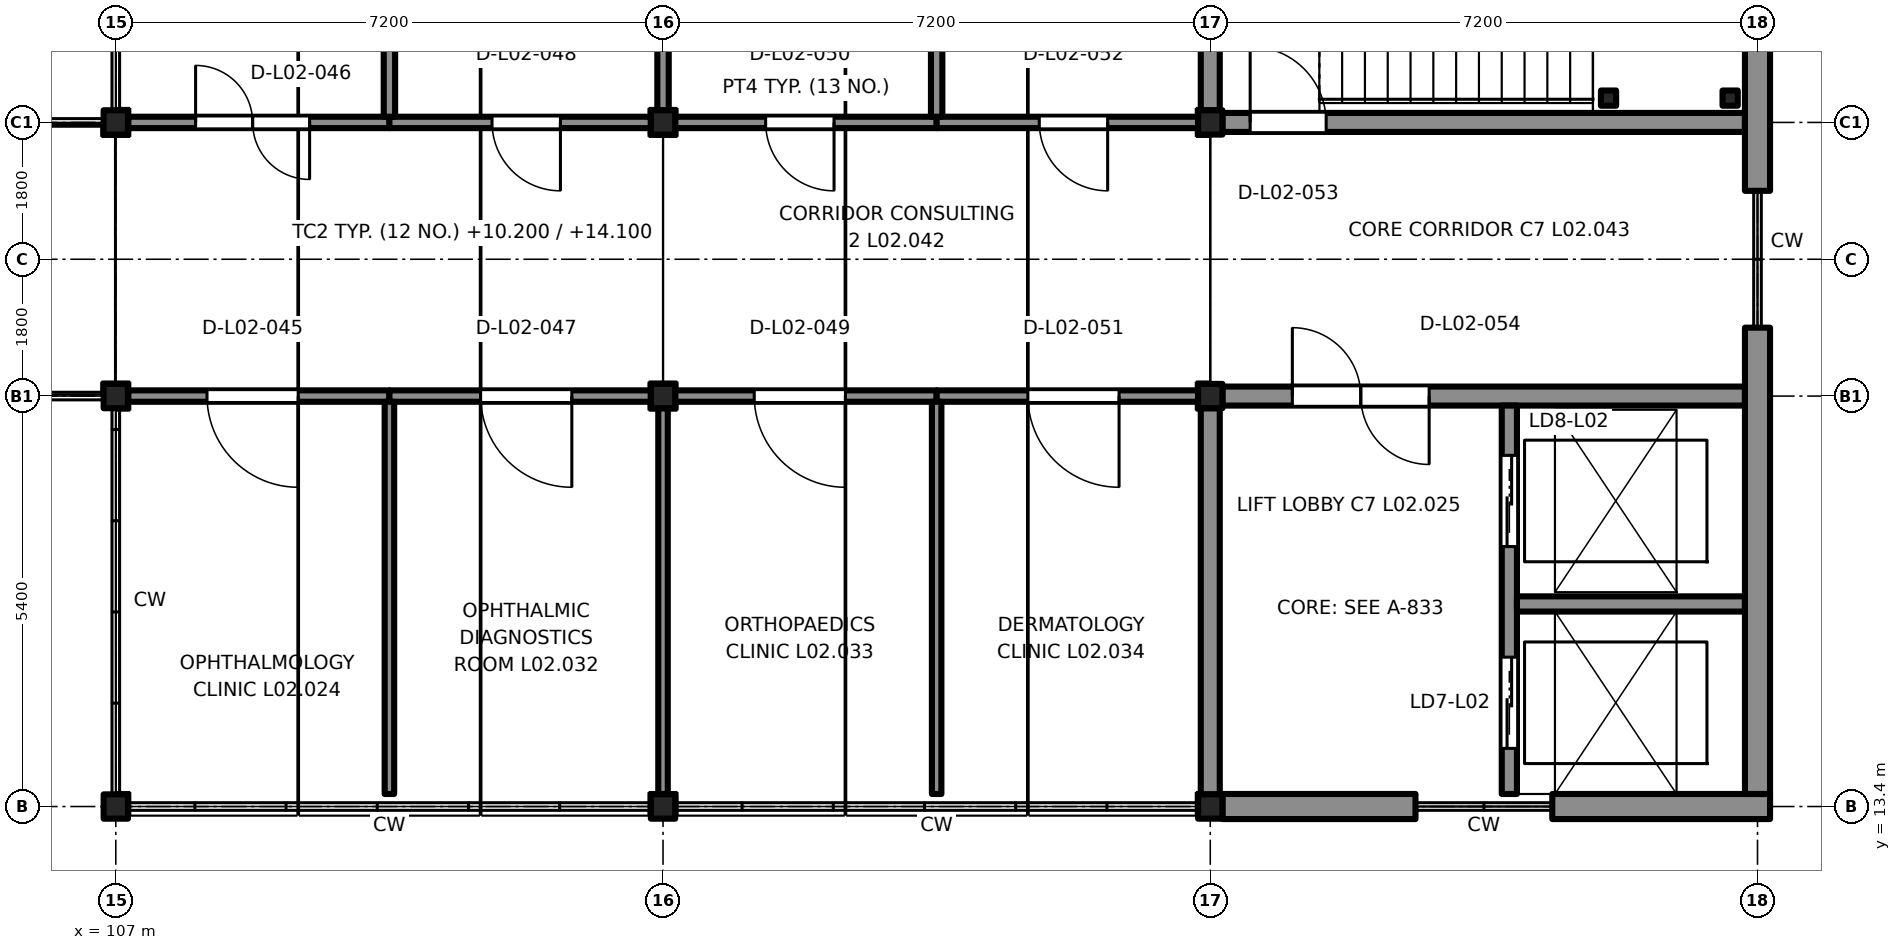
"""IFC4 building model, lengths in metres.
Left out: names, types, materials, properties, quantities, classifications, styles, units other than length and angle.
Written with IfcOpenShell. Run it as: python <this file> out.ifc"""

import sys

from ifc_helpers import new_model, si_unit, direction, frame, frame_2d, origin, origin_2d, place, context, subcontext, project, spatial, rectangle, extrude, element, fill, save


model = new_model("IFC4")
c1 = context("Model", 3, precision=1e-05, world=origin(), true_north=direction((0.0, 1.0)))
c2 = subcontext(c1, "Body", "Model", "MODEL_VIEW")
j1 = project(units=[si_unit("LENGTHUNIT", "METRE"), si_unit("PLANEANGLEUNIT", "RADIAN")], contexts=[c1])
p1 = place(None, origin())
s1 = spatial("IfcSite", under=j1, at=p1, CompositionType="ELEMENT")
p2 = place(p1, origin())
s2 = spatial("IfcBuilding", under=s1, at=p2, CompositionType="ELEMENT")
p3 = place(p2, frame((0.0, 0.0, 10.2)))
s3 = spatial("IfcBuildingStorey", under=s2, at=p3, CompositionType="ELEMENT", Elevation=10.2)
for number, where, z_axis, x_axis in (
    (1, (107.0, 13.4, 0.0), (0.0, 0.0, 1.0), (1.0, 0.0, 0.0)),
    (2, (107.0, 18.8, 0.0), (0.0, 0.0, 1.0), (1.0, 0.0, 0.0)),
    (3, (107.0, 22.4, 0.0), (0.0, 0.0, 1.0), (1.0, 0.0, 0.0)),
    (4, (114.2, 13.4, 0.0), (0.0, 0.0, 1.0), (1.0, 0.0, 0.0)),
    (5, (114.2, 18.8, 0.0), (0.0, 0.0, 1.0), (1.0, 0.0, 0.0)),
    (6, (114.2, 22.4, 0.0), (0.0, 0.0, 1.0), (1.0, 0.0, 0.0)),
    (7, (121.4, 13.4, 0.0), (0.0, 0.0, 1.0), (1.0, 0.0, 0.0)),
    (8, (121.4, 18.8, 0.0), (0.0, 0.0, 1.0), (1.0, 0.0, 0.0)),
    (9, (121.4, 22.4, 0.0), (0.0, 0.0, 1.0), (1.0, 0.0, 0.0)),
):
    element("IfcColumn", number, at=place(p3, frame(where, z_axis=z_axis, x_axis=x_axis)), inside=s3, PredefinedType="COLUMN", context=c2, shape_type="SweptSolid", body=[
        extrude(rectangle(XDim=0.32, YDim=0.32, at=origin_2d()), origin(), (0.0, 0.0, 1.0), 3.9),
    ])
p4 = place(p3, frame((121.56, 22.4, 0.0), z_axis=(0.0, 0.0, 1.0), x_axis=(1.0, 0.0, 0.0)))
e10 = element("IfcWall", 10, at=p4, inside=s3, PredefinedType="SHEAR", context=c2, shape_type="SweptSolid", body=[
    extrude(rectangle(XDim=6.875, YDim=0.25, at=frame_2d((3.438, 0.0))), origin(), (0.0, 0.0, 1.0), 3.65),
])
p5 = place(p4, frame((0.365, 0.0, 0.0)))
e11 = element("IfcOpeningElement", 11, at=p5, cuts=e10, PredefinedType="OPENING", context=c2, shape_type="SweptSolid", body=[
    extrude(rectangle(XDim=1.0, YDim=2.1, at=frame_2d((0.5, 1.05))), frame((0.0, 0.135, 0.0), z_axis=(0.0, -1.0, 0.0), x_axis=(1.0, 0.0, 0.0)), (0.0, 0.0, 1.0), 0.27),
])
p6 = place(p3, frame((121.4, 22.56, 0.0), z_axis=(0.0, 0.0, 1.0), x_axis=(0.0, 1.0, 0.0)))
e12 = element("IfcWall", 12, at=p6, inside=s3, PredefinedType="SHEAR", context=c2, shape_type="SweptSolid", body=[
    extrude(rectangle(XDim=5.08, YDim=0.25, at=frame_2d((2.54, 0.0))), origin(), (0.0, 0.0, 1.0), 3.65),
])
p7 = place(p3, frame((121.56, 18.8, 0.0), z_axis=(0.0, 0.0, 1.0), x_axis=(1.0, 0.0, 0.0)))
e13 = element("IfcWall", 13, at=p7, inside=s3, PredefinedType="SHEAR", context=c2, shape_type="SweptSolid", body=[
    extrude(rectangle(XDim=6.875, YDim=0.25, at=frame_2d((3.438, 0.0))), origin(), (0.0, 0.0, 1.0), 3.65),
])
p8 = place(p7, frame((0.92, 0.0, 0.0)))
e14 = element("IfcOpeningElement", 14, at=p8, cuts=e13, PredefinedType="OPENING", context=c2, shape_type="SweptSolid", body=[
    extrude(rectangle(XDim=1.8, YDim=2.1, at=frame_2d((0.9, 1.05))), frame((0.0, 0.135, 0.0), z_axis=(0.0, -1.0, 0.0), x_axis=(1.0, 0.0, 0.0)), (0.0, 0.0, 1.0), 0.27),
])
p9 = place(p3, frame((121.4, 13.56, 0.0), z_axis=(0.0, 0.0, 1.0), x_axis=(0.0, 1.0, 0.0)))
e15 = element("IfcWall", 15, at=p9, inside=s3, PredefinedType="SHEAR", context=c2, shape_type="SweptSolid", body=[
    extrude(rectangle(XDim=5.08, YDim=0.25, at=frame_2d((2.54, 0.0))), origin(), (0.0, 0.0, 1.0), 3.65),
])
p10 = place(p3, frame((125.335, 13.565, 0.0), z_axis=(0.0, 0.0, 1.0), x_axis=(0.0, 1.0, 0.0)))
e16 = element("IfcWall", 16, at=p10, inside=s3, PredefinedType="SHEAR", context=c2, shape_type="SweptSolid", body=[
    extrude(rectangle(XDim=5.11, YDim=0.2, at=frame_2d((2.555, 0.0))), origin(), (0.0, 0.0, 1.0), 3.65),
])
p11 = place(p10, frame((0.6, 0.0, 0.0)))
e17 = element("IfcOpeningElement", 17, at=p11, cuts=e16, PredefinedType="OPENING", context=c2, shape_type="SweptSolid", body=[
    extrude(rectangle(XDim=1.2, YDim=2.1, at=frame_2d((0.6, 1.05))), frame((0.0, 0.11, 0.0), z_axis=(0.0, -1.0, 0.0), x_axis=(1.0, 0.0, 0.0)), (0.0, 0.0, 1.0), 0.22),
])
p12 = place(p10, frame((3.255, 0.0, 0.0)))
e18 = element("IfcOpeningElement", 18, at=p12, cuts=e16, PredefinedType="OPENING", context=c2, shape_type="SweptSolid", body=[
    extrude(rectangle(XDim=1.2, YDim=2.1, at=frame_2d((0.6, 1.05))), frame((0.0, 0.11, 0.0), z_axis=(0.0, -1.0, 0.0), x_axis=(1.0, 0.0, 0.0)), (0.0, 0.0, 1.0), 0.22),
])
p13 = place(p3, frame((128.435, 16.065, 0.0), z_axis=(0.0, 0.0, 1.0), x_axis=(-1.0, 0.0, 0.0)))
e19 = element("IfcWall", 19, at=p13, inside=s3, PredefinedType="SHEAR", context=c2, shape_type="SweptSolid", body=[
    extrude(rectangle(XDim=3.0, YDim=0.2, at=frame_2d((1.5, 0.0))), origin(), (0.0, 0.0, 1.0), 3.65),
])
for number, where, z_axis, x_axis in (
    (20, (128.24, 22.72, 0.0), (0.0, 0.0, 1.0), (1.0, 0.0, 0.0)),
    (21, (126.64, 22.72, 0.0), (0.0, 0.0, 1.0), (1.0, 0.0, 0.0)),
):
    element("IfcColumn", number, at=place(p3, frame(where, z_axis=z_axis, x_axis=x_axis)), inside=s3, PredefinedType="COLUMN", context=c2, shape_type="SweptSolid", body=[
        extrude(rectangle(XDim=0.2, YDim=0.2, at=origin_2d()), origin(), (0.0, 0.0, 1.0), 3.9),
    ])
p14 = place(p3, frame((124.1, 13.4, 0.0), z_axis=(0.0, 0.0, 1.0), x_axis=(-1.0, 0.0, 0.0)))
e22 = element("IfcWall", 22, at=p14, inside=s3, PredefinedType="SOLIDWALL", context=c2, shape_type="SweptSolid", body=[
    extrude(rectangle(XDim=2.54, YDim=0.33, at=frame_2d((1.27, 0.0))), origin(), (0.0, 0.0, 1.0), 3.22),
])
p15 = place(p3, frame((128.765, 13.4, 0.0), z_axis=(0.0, 0.0, 1.0), x_axis=(-1.0, 0.0, 0.0)))
e23 = element("IfcWall", 23, at=p15, inside=s3, PredefinedType="SOLIDWALL", context=c2, shape_type="SweptSolid", body=[
    extrude(rectangle(XDim=2.865, YDim=0.33, at=frame_2d((1.433, 0.0))), origin(), (0.0, 0.0, 1.0), 3.22),
])
p16 = place(p3, frame((128.6, 19.7, 0.0), z_axis=(0.0, 0.0, 1.0), x_axis=(0.0, -1.0, 0.0)))
e24 = element("IfcWall", 24, at=p16, inside=s3, PredefinedType="SOLIDWALL", context=c2, shape_type="SweptSolid", body=[
    extrude(rectangle(XDim=6.135, YDim=0.33, at=frame_2d((3.067, 0.0))), origin(), (0.0, 0.0, 1.0), 3.2),
])
p17 = place(p3, frame((128.6, 24.48, 0.0), z_axis=(0.0, 0.0, 1.0), x_axis=(0.0, -1.0, 0.0)))
e25 = element("IfcWall", 25, at=p17, inside=s3, PredefinedType="SOLIDWALL", context=c2, shape_type="SweptSolid", body=[
    extrude(rectangle(XDim=2.98, YDim=0.33, at=frame_2d((1.49, 0.0))), origin(), (0.0, 0.0, 1.0), 3.2),
])
p18 = place(p3, frame((110.6, 18.8, 0.0), z_axis=(0.0, 0.0, 1.0), x_axis=(-1.0, 0.0, 0.0)))
e26 = element("IfcWall", 26, at=p18, inside=s3, PredefinedType="PARTITIONING", context=c2, shape_type="SweptSolid", body=[
    extrude(rectangle(XDim=3.435, YDim=0.15, at=frame_2d((1.718, 0.0))), origin(), (0.0, 0.0, 1.0), 3.22),
])
p19 = place(p18, frame((1.2, 0.0, 0.0)))
e27 = element("IfcOpeningElement", 27, at=p19, cuts=e26, PredefinedType="OPENING", context=c2, shape_type="SweptSolid", body=[
    extrude(rectangle(XDim=1.2, YDim=2.1, at=frame_2d((0.6, 1.05))), frame((0.0, 0.085, 0.0), z_axis=(0.0, -1.0, 0.0), x_axis=(1.0, 0.0, 0.0)), (0.0, 0.0, 1.0), 0.17),
])
p20 = place(p3, frame((114.04, 18.8, 0.0), z_axis=(0.0, 0.0, 1.0), x_axis=(-1.0, 0.0, 0.0)))
e28 = element("IfcWall", 28, at=p20, inside=s3, PredefinedType="PARTITIONING", context=c2, shape_type="SweptSolid", body=[
    extrude(rectangle(XDim=3.44, YDim=0.15, at=frame_2d((1.72, 0.0))), origin(), (0.0, 0.0, 1.0), 3.22),
])
p21 = place(p20, frame((1.04, 0.0, 0.0)))
e29 = element("IfcOpeningElement", 29, at=p21, cuts=e28, PredefinedType="OPENING", context=c2, shape_type="SweptSolid", body=[
    extrude(rectangle(XDim=1.2, YDim=2.1, at=frame_2d((0.6, 1.05))), frame((0.0, 0.085, 0.0), z_axis=(0.0, -1.0, 0.0), x_axis=(1.0, 0.0, 0.0)), (0.0, 0.0, 1.0), 0.17),
])
p22 = place(p3, frame((110.6, 13.565, 0.0), z_axis=(0.0, 0.0, 1.0), x_axis=(0.0, 1.0, 0.0)))
e30 = element("IfcWall", 30, at=p22, inside=s3, PredefinedType="PARTITIONING", context=c2, shape_type="SweptSolid", body=[
    extrude(rectangle(XDim=5.16, YDim=0.125, at=frame_2d((2.58, 0.0))), origin(), (0.0, 0.0, 1.0), 3.38),
])
p23 = place(p3, frame((117.8, 18.8, 0.0), z_axis=(0.0, 0.0, 1.0), x_axis=(-1.0, 0.0, 0.0)))
e31 = element("IfcWall", 31, at=p23, inside=s3, PredefinedType="PARTITIONING", context=c2, shape_type="SweptSolid", body=[
    extrude(rectangle(XDim=3.44, YDim=0.15, at=frame_2d((1.72, 0.0))), origin(), (0.0, 0.0, 1.0), 3.22),
])
p24 = place(p23, frame((1.2, 0.0, 0.0)))
e32 = element("IfcOpeningElement", 32, at=p24, cuts=e31, PredefinedType="OPENING", context=c2, shape_type="SweptSolid", body=[
    extrude(rectangle(XDim=1.2, YDim=2.1, at=frame_2d((0.6, 1.05))), frame((0.0, 0.085, 0.0), z_axis=(0.0, -1.0, 0.0), x_axis=(1.0, 0.0, 0.0)), (0.0, 0.0, 1.0), 0.17),
])
p25 = place(p3, frame((114.2, 13.565, 0.0), z_axis=(0.0, 0.0, 1.0), x_axis=(0.0, 1.0, 0.0)))
e33 = element("IfcWall", 33, at=p25, inside=s3, PredefinedType="PARTITIONING", context=c2, shape_type="SweptSolid", body=[
    extrude(rectangle(XDim=5.075, YDim=0.125, at=frame_2d((2.538, 0.0))), origin(), (0.0, 0.0, 1.0), 3.38),
])
p26 = place(p3, frame((121.24, 18.8, 0.0), z_axis=(0.0, 0.0, 1.0), x_axis=(-1.0, 0.0, 0.0)))
e34 = element("IfcWall", 34, at=p26, inside=s3, PredefinedType="PARTITIONING", context=c2, shape_type="SweptSolid", body=[
    extrude(rectangle(XDim=3.44, YDim=0.15, at=frame_2d((1.72, 0.0))), origin(), (0.0, 0.0, 1.0), 3.22),
])
p27 = place(p26, frame((1.04, 0.0, 0.0)))
e35 = element("IfcOpeningElement", 35, at=p27, cuts=e34, PredefinedType="OPENING", context=c2, shape_type="SweptSolid", body=[
    extrude(rectangle(XDim=1.2, YDim=2.1, at=frame_2d((0.6, 1.05))), frame((0.0, 0.085, 0.0), z_axis=(0.0, -1.0, 0.0), x_axis=(1.0, 0.0, 0.0)), (0.0, 0.0, 1.0), 0.17),
])
p28 = place(p3, frame((117.8, 13.565, 0.0), z_axis=(0.0, 0.0, 1.0), x_axis=(0.0, 1.0, 0.0)))
e36 = element("IfcWall", 36, at=p28, inside=s3, PredefinedType="PARTITIONING", context=c2, shape_type="SweptSolid", body=[
    extrude(rectangle(XDim=5.16, YDim=0.125, at=frame_2d((2.58, 0.0))), origin(), (0.0, 0.0, 1.0), 3.38),
])
p29 = place(p3, frame((107.165, 22.4, 0.0), z_axis=(0.0, 0.0, 1.0), x_axis=(1.0, 0.0, 0.0)))
e37 = element("IfcWall", 37, at=p29, inside=s3, PredefinedType="PARTITIONING", context=c2, shape_type="SweptSolid", body=[
    extrude(rectangle(XDim=3.435, YDim=0.15, at=frame_2d((1.718, 0.0))), origin(), (0.0, 0.0, 1.0), 3.22),
])
p30 = place(p29, frame((0.885, 0.0, 0.0)))
e38 = element("IfcOpeningElement", 38, at=p30, cuts=e37, PredefinedType="OPENING", context=c2, shape_type="SweptSolid", body=[
    extrude(rectangle(XDim=1.5, YDim=2.1, at=frame_2d((0.75, 1.05))), frame((0.0, 0.085, 0.0), z_axis=(0.0, -1.0, 0.0), x_axis=(1.0, 0.0, 0.0)), (0.0, 0.0, 1.0), 0.17),
])
p31 = place(p3, frame((114.04, 22.4, 0.0), z_axis=(0.0, 0.0, 1.0), x_axis=(-1.0, 0.0, 0.0)))
e39 = element("IfcWall", 39, at=p31, inside=s3, PredefinedType="PARTITIONING", context=c2, shape_type="SweptSolid", body=[
    extrude(rectangle(XDim=3.44, YDim=0.15, at=frame_2d((1.72, 0.0))), origin(), (0.0, 0.0, 1.0), 3.22),
])
p32 = place(p31, frame((1.19, 0.0, 0.0)))
e40 = element("IfcOpeningElement", 40, at=p32, cuts=e39, PredefinedType="OPENING", context=c2, shape_type="SweptSolid", body=[
    extrude(rectangle(XDim=0.9, YDim=2.1, at=frame_2d((0.45, 1.05))), frame((0.0, 0.085, 0.0), z_axis=(0.0, -1.0, 0.0), x_axis=(1.0, 0.0, 0.0)), (0.0, 0.0, 1.0), 0.17),
])
p33 = place(p3, frame((110.6, 27.635, 0.0), z_axis=(0.0, 0.0, 1.0), x_axis=(0.0, -1.0, 0.0)))
e41 = element("IfcWall", 41, at=p33, inside=s3, PredefinedType="PARTITIONING", context=c2, shape_type="SweptSolid", body=[
    extrude(rectangle(XDim=5.16, YDim=0.15, at=frame_2d((2.58, 0.0))), origin(), (0.0, 0.0, 1.0), 3.38),
])
p34 = place(p3, frame((117.8, 22.4, 0.0), z_axis=(0.0, 0.0, 1.0), x_axis=(-1.0, 0.0, 0.0)))
e42 = element("IfcWall", 42, at=p34, inside=s3, PredefinedType="PARTITIONING", context=c2, shape_type="SweptSolid", body=[
    extrude(rectangle(XDim=3.44, YDim=0.15, at=frame_2d((1.72, 0.0))), origin(), (0.0, 0.0, 1.0), 3.22),
])
p35 = place(p34, frame((1.35, 0.0, 0.0)))
e43 = element("IfcOpeningElement", 43, at=p35, cuts=e42, PredefinedType="OPENING", context=c2, shape_type="SweptSolid", body=[
    extrude(rectangle(XDim=0.9, YDim=2.1, at=frame_2d((0.45, 1.05))), frame((0.0, 0.085, 0.0), z_axis=(0.0, -1.0, 0.0), x_axis=(1.0, 0.0, 0.0)), (0.0, 0.0, 1.0), 0.17),
])
p36 = place(p3, frame((114.2, 27.635, 0.0), z_axis=(0.0, 0.0, 1.0), x_axis=(0.0, -1.0, 0.0)))
e44 = element("IfcWall", 44, at=p36, inside=s3, PredefinedType="PARTITIONING", context=c2, shape_type="SweptSolid", body=[
    extrude(rectangle(XDim=5.075, YDim=0.15, at=frame_2d((2.538, 0.0))), origin(), (0.0, 0.0, 1.0), 3.38),
])
p37 = place(p3, frame((121.24, 22.4, 0.0), z_axis=(0.0, 0.0, 1.0), x_axis=(-1.0, 0.0, 0.0)))
e45 = element("IfcWall", 45, at=p37, inside=s3, PredefinedType="PARTITIONING", context=c2, shape_type="SweptSolid", body=[
    extrude(rectangle(XDim=3.44, YDim=0.15, at=frame_2d((1.72, 0.0))), origin(), (0.0, 0.0, 1.0), 3.22),
])
p38 = place(p37, frame((1.19, 0.0, 0.0)))
e46 = element("IfcOpeningElement", 46, at=p38, cuts=e45, PredefinedType="OPENING", context=c2, shape_type="SweptSolid", body=[
    extrude(rectangle(XDim=0.9, YDim=2.1, at=frame_2d((0.45, 1.05))), frame((0.0, 0.085, 0.0), z_axis=(0.0, -1.0, 0.0), x_axis=(1.0, 0.0, 0.0)), (0.0, 0.0, 1.0), 0.17),
])
p39 = place(p3, frame((117.8, 27.635, 0.0), z_axis=(0.0, 0.0, 1.0), x_axis=(0.0, -1.0, 0.0)))
e47 = element("IfcWall", 47, at=p39, inside=s3, PredefinedType="PARTITIONING", context=c2, shape_type="SweptSolid", body=[
    extrude(rectangle(XDim=5.16, YDim=0.15, at=frame_2d((2.58, 0.0))), origin(), (0.0, 0.0, 1.0), 3.38),
])
p40 = place(p5, origin())
e48 = element("IfcDoor", 48, at=p40, inside=s3, OperationType="SINGLE_SWING_RIGHT", PredefinedType="DOOR", context=c2, shape_type="SweptSolid", body=[
    extrude(rectangle(XDim=1.0, YDim=2.1, at=frame_2d((0.5, 1.05))), frame((0.0, 0.025, 0.0), z_axis=(0.0, -1.0, 0.0), x_axis=(1.0, 0.0, 0.0)), (0.0, 0.0, 1.0), 0.05),
])
fill(e11, e48)
p41 = place(p8, origin())
e49 = element("IfcDoor", 49, at=p41, inside=s3, OperationType="DOUBLE_DOOR_SINGLE_SWING", PredefinedType="DOOR", context=c2, shape_type="SweptSolid", body=[
    extrude(rectangle(XDim=1.8, YDim=2.1, at=frame_2d((0.9, 1.05))), frame((0.0, 0.025, 0.0), z_axis=(0.0, -1.0, 0.0), x_axis=(1.0, 0.0, 0.0)), (0.0, 0.0, 1.0), 0.05),
])
fill(e14, e49)
p42 = place(p11, origin())
e50 = element("IfcDoor", 50, at=p42, inside=s3, OperationType="DOUBLE_DOOR_SLIDING", PredefinedType="DOOR", context=c2, shape_type="SweptSolid", body=[
    extrude(rectangle(XDim=1.2, YDim=2.1, at=frame_2d((0.6, 1.05))), frame((0.0, 0.025, 0.0), z_axis=(0.0, -1.0, 0.0), x_axis=(1.0, 0.0, 0.0)), (0.0, 0.0, 1.0), 0.05),
])
fill(e17, e50)
p43 = place(p12, origin())
e51 = element("IfcDoor", 51, at=p43, inside=s3, OperationType="DOUBLE_DOOR_SLIDING", PredefinedType="DOOR", context=c2, shape_type="SweptSolid", body=[
    extrude(rectangle(XDim=1.2, YDim=2.1, at=frame_2d((0.6, 1.05))), frame((0.0, 0.025, 0.0), z_axis=(0.0, -1.0, 0.0), x_axis=(1.0, 0.0, 0.0)), (0.0, 0.0, 1.0), 0.05),
])
fill(e18, e51)
p44 = place(p19, origin())
e52 = element("IfcDoor", 52, at=p44, inside=s3, OperationType="SINGLE_SWING_RIGHT", PredefinedType="DOOR", context=c2, shape_type="SweptSolid", body=[
    extrude(rectangle(XDim=1.2, YDim=2.1, at=frame_2d((0.6, 1.05))), frame((0.0, 0.025, 0.0), z_axis=(0.0, -1.0, 0.0), x_axis=(1.0, 0.0, 0.0)), (0.0, 0.0, 1.0), 0.05),
])
fill(e27, e52)
p45 = place(p21, origin())
e53 = element("IfcDoor", 53, at=p45, inside=s3, OperationType="SINGLE_SWING_LEFT", PredefinedType="DOOR", context=c2, shape_type="SweptSolid", body=[
    extrude(rectangle(XDim=1.2, YDim=2.1, at=frame_2d((0.6, 1.05))), frame((0.0, 0.025, 0.0), z_axis=(0.0, -1.0, 0.0), x_axis=(1.0, 0.0, 0.0)), (0.0, 0.0, 1.0), 0.05),
])
fill(e29, e53)
p46 = place(p24, origin())
e54 = element("IfcDoor", 54, at=p46, inside=s3, OperationType="SINGLE_SWING_RIGHT", PredefinedType="DOOR", context=c2, shape_type="SweptSolid", body=[
    extrude(rectangle(XDim=1.2, YDim=2.1, at=frame_2d((0.6, 1.05))), frame((0.0, 0.025, 0.0), z_axis=(0.0, -1.0, 0.0), x_axis=(1.0, 0.0, 0.0)), (0.0, 0.0, 1.0), 0.05),
])
fill(e32, e54)
p47 = place(p27, origin())
e55 = element("IfcDoor", 55, at=p47, inside=s3, OperationType="SINGLE_SWING_LEFT", PredefinedType="DOOR", context=c2, shape_type="SweptSolid", body=[
    extrude(rectangle(XDim=1.2, YDim=2.1, at=frame_2d((0.6, 1.05))), frame((0.0, 0.025, 0.0), z_axis=(0.0, -1.0, 0.0), x_axis=(1.0, 0.0, 0.0)), (0.0, 0.0, 1.0), 0.05),
])
fill(e35, e55)
p48 = place(p30, origin())
e56 = element("IfcDoor", 56, at=p48, inside=s3, OperationType="DOUBLE_DOOR_SINGLE_SWING", PredefinedType="DOOR", context=c2, shape_type="SweptSolid", body=[
    extrude(rectangle(XDim=1.5, YDim=2.1, at=frame_2d((0.75, 1.05))), frame((0.0, 0.025, 0.0), z_axis=(0.0, -1.0, 0.0), x_axis=(1.0, 0.0, 0.0)), (0.0, 0.0, 1.0), 0.05),
])
fill(e38, e56)
p49 = place(p32, origin())
e57 = element("IfcDoor", 57, at=p49, inside=s3, OperationType="SINGLE_SWING_LEFT", PredefinedType="DOOR", context=c2, shape_type="SweptSolid", body=[
    extrude(rectangle(XDim=0.9, YDim=2.1, at=frame_2d((0.45, 1.05))), frame((0.0, 0.025, 0.0), z_axis=(0.0, -1.0, 0.0), x_axis=(1.0, 0.0, 0.0)), (0.0, 0.0, 1.0), 0.05),
])
fill(e40, e57)
p50 = place(p35, origin())
e58 = element("IfcDoor", 58, at=p50, inside=s3, OperationType="SINGLE_SWING_RIGHT", PredefinedType="DOOR", context=c2, shape_type="SweptSolid", body=[
    extrude(rectangle(XDim=0.9, YDim=2.1, at=frame_2d((0.45, 1.05))), frame((0.0, 0.025, 0.0), z_axis=(0.0, -1.0, 0.0), x_axis=(1.0, 0.0, 0.0)), (0.0, 0.0, 1.0), 0.05),
])
fill(e43, e58)
p51 = place(p38, origin())
e59 = element("IfcDoor", 59, at=p51, inside=s3, OperationType="SINGLE_SWING_LEFT", PredefinedType="DOOR", context=c2, shape_type="SweptSolid", body=[
    extrude(rectangle(XDim=0.9, YDim=2.1, at=frame_2d((0.45, 1.05))), frame((0.0, 0.025, 0.0), z_axis=(0.0, -1.0, 0.0), x_axis=(1.0, 0.0, 0.0)), (0.0, 0.0, 1.0), 0.05),
])
fill(e46, e59)
save(model, sys.argv[1])
